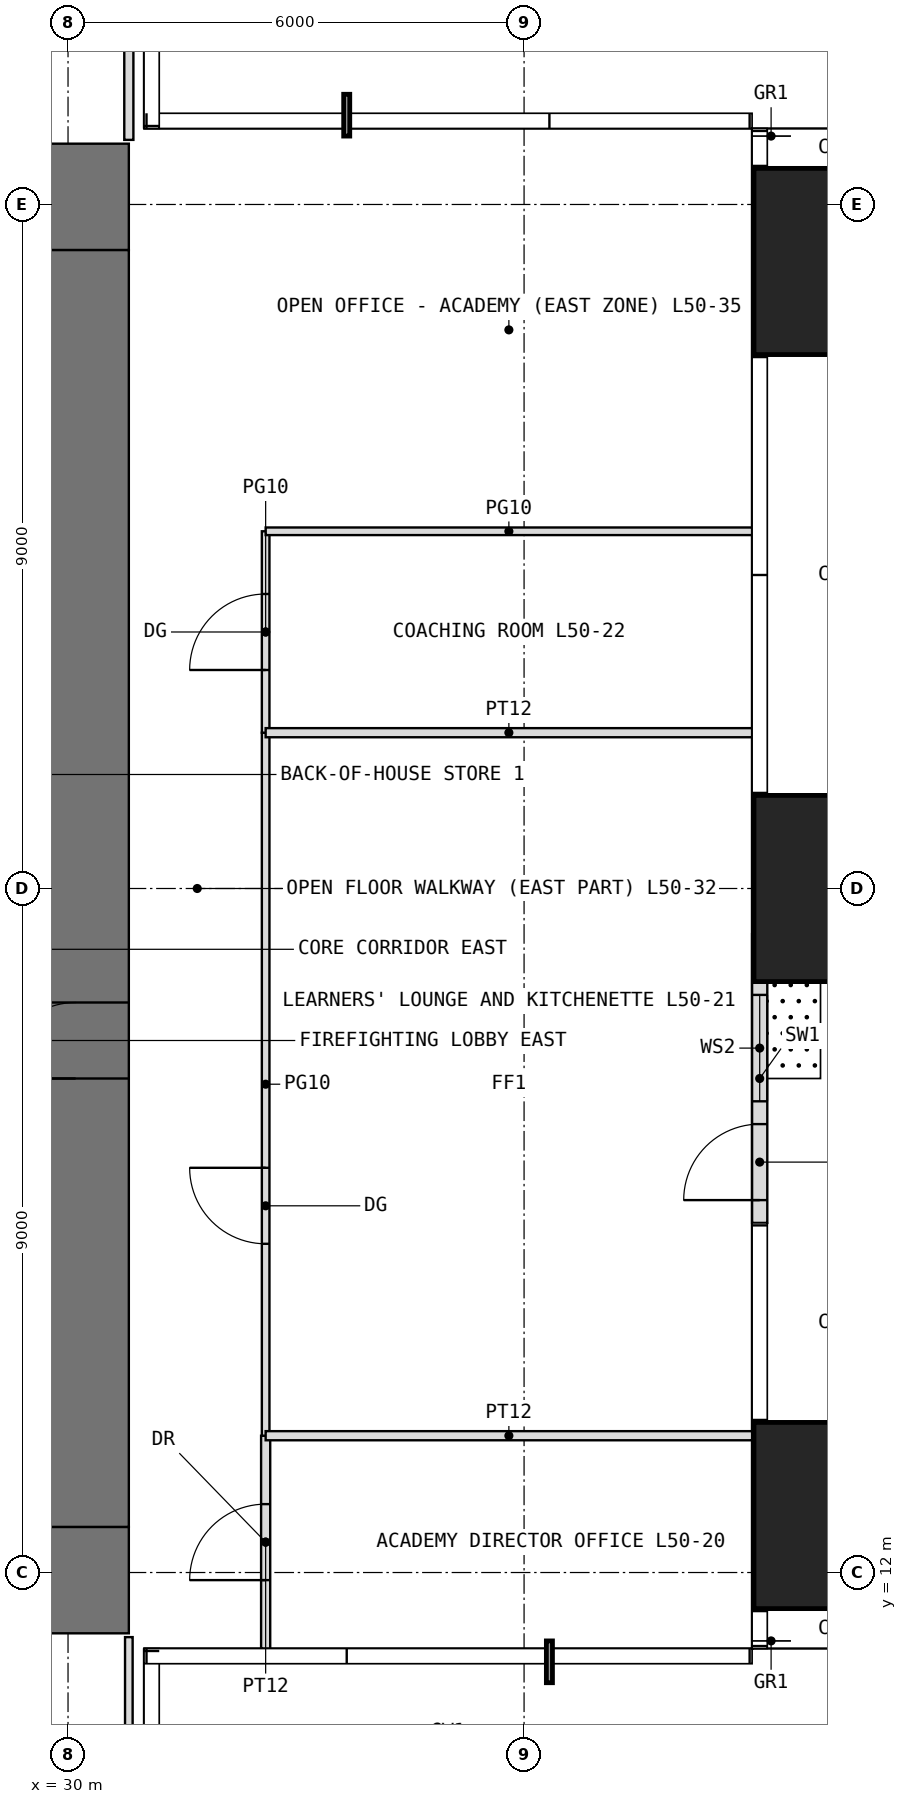
"""IFC4 building model, lengths in metres.
Left out: names, types, materials, properties, quantities, classifications, styles, units other than length and angle.
Written with IfcOpenShell. Run it as: python <this file> out.ifc"""

import sys

from ifc_helpers import new_model, si_unit, direction, frame, frame_2d, origin, origin_2d, place, context, subcontext, project, spatial, rectangle, extrude, element, fill, save


model = new_model("IFC4")
c1 = context("Model", 3, precision=1e-05, world=origin(), true_north=direction((0.0, 1.0)))
c2 = subcontext(c1, "Body", "Model", "MODEL_VIEW")
j1 = project(units=[si_unit("LENGTHUNIT", "METRE"), si_unit("PLANEANGLEUNIT", "RADIAN")], contexts=[c1])
p1 = place(None, origin())
s1 = spatial("IfcSite", under=j1, at=p1, CompositionType="ELEMENT")
p2 = place(p1, origin())
s2 = spatial("IfcBuilding", under=s1, at=p2, CompositionType="ELEMENT")
p3 = place(p2, frame((0.0, 0.0, 210.5)))
s3 = spatial("IfcBuildingStorey", under=s2, at=p3, CompositionType="ELEMENT", Elevation=210.5)
for number, where, z_axis, x_axis in (
    (1, (40.25, 12.75, 0.0), (0.0, 0.0, 1.0), (1.0, 0.0, 0.0)),
    (2, (40.25, 21.0, 0.0), (0.0, 0.0, 1.0), (1.0, 0.0, 0.0)),
    (3, (40.25, 29.25, 0.0), (0.0, 0.0, 1.0), (1.0, 0.0, 0.0)),
):
    element("IfcColumn", number, at=place(p3, frame(where, z_axis=z_axis, x_axis=x_axis)), inside=s3, PredefinedType="COLUMN", context=c2, shape_type="SweptSolid", body=[
        extrude(rectangle(XDim=2.45, YDim=2.45, at=origin_2d()), origin(), (0.0, 0.0, 1.0), 4.0),
    ])
p4 = place(p3, frame((39.1, 16.6, 0.0), z_axis=(0.0, 0.0, 1.0), x_axis=(0.0, 1.0, 0.0)))
e4 = element("IfcWall", 4, at=p4, inside=s3, PredefinedType="USERDEFINED", context=c2, shape_type="SweptSolid", body=[
    extrude(rectangle(XDim=3.8, YDim=0.2, at=frame_2d((1.9, 0.0))), origin(), (0.0, 0.0, 1.0), 3.75),
])
p5 = place(p4, frame((0.3, 0.0, 0.0)))
e5 = element("IfcOpeningElement", 5, at=p5, cuts=e4, PredefinedType="OPENING", context=c2, shape_type="SweptSolid", body=[
    extrude(rectangle(XDim=1.0, YDim=2.4, at=frame_2d((0.5, 1.2))), frame((0.0, 0.11, 0.0), z_axis=(0.0, -1.0, 0.0), x_axis=(1.0, 0.0, 0.0)), (0.0, 0.0, 1.0), 0.22),
])
p6 = place(p4, frame((1.6, 0.0, 0.3)))
e6 = element("IfcOpeningElement", 6, at=p6, cuts=e4, PredefinedType="OPENING", context=c2, shape_type="SweptSolid", body=[
    extrude(rectangle(XDim=1.4, YDim=2.7, at=frame_2d((0.7, 1.35))), frame((0.0, 0.11, 0.0), z_axis=(0.0, -1.0, 0.0), x_axis=(1.0, 0.0, 0.0)), (0.0, 0.0, 1.0), 0.22),
])
p7 = place(p3, frame((11.2, 11.9, -0.05), z_axis=(0.0, 0.0, 1.0), x_axis=(1.0, 0.0, 0.0)))
e7 = element("IfcWall", 7, at=p7, inside=s3, PredefinedType="SHEAR", context=c2, shape_type="SweptSolid", body=[
    extrude(rectangle(XDim=19.6, YDim=1.4, at=frame_2d((9.8, 0.0))), origin(), (0.0, 0.0, 1.0), 4.0),
])
p8 = place(p7, frame((8.8, 0.0, 0.05)))
e8 = element("IfcOpeningElement", 8, at=p8, cuts=e7, PredefinedType="OPENING", context=c2, shape_type="SweptSolid", body=[
    extrude(rectangle(XDim=2.0, YDim=2.2, at=frame_2d((1.0, 1.1))), frame((0.0, 0.71, 0.0), z_axis=(0.0, -1.0, 0.0), x_axis=(1.0, 0.0, 0.0)), (0.0, 0.0, 1.0), 1.42),
])
p9 = place(p3, frame((11.2, 30.1, -0.05), z_axis=(0.0, 0.0, 1.0), x_axis=(1.0, 0.0, 0.0)))
e9 = element("IfcWall", 9, at=p9, inside=s3, PredefinedType="SHEAR", context=c2, shape_type="SweptSolid", body=[
    extrude(rectangle(XDim=19.6, YDim=1.4, at=frame_2d((9.8, 0.0))), origin(), (0.0, 0.0, 1.0), 4.0),
])
p10 = place(p9, frame((8.8, 0.0, 0.05)))
e10 = element("IfcOpeningElement", 10, at=p10, cuts=e9, PredefinedType="OPENING", context=c2, shape_type="SweptSolid", body=[
    extrude(rectangle(XDim=2.0, YDim=2.2, at=frame_2d((1.0, 1.1))), frame((0.0, 0.71, 0.0), z_axis=(0.0, -1.0, 0.0), x_axis=(1.0, 0.0, 0.0)), (0.0, 0.0, 1.0), 1.42),
])
p11 = place(p3, frame((30.1, 12.6, -0.05), z_axis=(0.0, 0.0, 1.0), x_axis=(0.0, 1.0, 0.0)))
e11 = element("IfcWall", 11, at=p11, inside=s3, PredefinedType="SHEAR", context=c2, shape_type="SweptSolid", body=[
    extrude(rectangle(XDim=16.8, YDim=1.4, at=frame_2d((8.4, 0.0))), origin(), (0.0, 0.0, 1.0), 4.0),
])
p12 = place(p11, frame((5.9, 0.0, 0.05)))
e12 = element("IfcOpeningElement", 12, at=p12, cuts=e11, PredefinedType="OPENING", context=c2, shape_type="SweptSolid", body=[
    extrude(rectangle(XDim=1.0, YDim=2.2, at=frame_2d((0.5, 1.1))), frame((0.0, 0.71, 0.0), z_axis=(0.0, -1.0, 0.0), x_axis=(1.0, 0.0, 0.0)), (0.0, 0.0, 1.0), 1.42),
])
p13 = place(p3, frame((30.8, 5.6, 0.0), z_axis=(0.0, 0.0, 1.0), x_axis=(0.0, 1.0, 0.0)))
e13 = element("IfcWall", 13, at=p13, inside=s3, PredefinedType="PARTITIONING", context=c2, shape_type="SweptSolid", body=[
    extrude(rectangle(XDim=5.55, YDim=0.1, at=frame_2d((2.775, 0.0))), origin(), (0.0, 0.0, 1.0), 3.75),
])
p14 = place(p3, frame((30.8, 30.85, 0.0), z_axis=(0.0, 0.0, 1.0), x_axis=(0.0, 1.0, 0.0)))
e14 = element("IfcWall", 14, at=p14, inside=s3, PredefinedType="PARTITIONING", context=c2, shape_type="SweptSolid", body=[
    extrude(rectangle(XDim=4.45, YDim=0.12, at=frame_2d((2.225, 0.0))), origin(), (0.0, 0.0, 1.0), 3.75),
])
p15 = place(p3, frame((32.6, 11.0, 0.0), z_axis=(0.0, 0.0, 1.0), x_axis=(0.0, 1.0, 0.0)))
e15 = element("IfcWall", 15, at=p15, inside=s3, PredefinedType="PARTITIONING", context=c2, shape_type="SweptSolid", body=[
    extrude(rectangle(XDim=2.8, YDim=0.12, at=frame_2d((1.4, 0.0))), origin(), (0.0, 0.0, 1.0), 3.75),
])
p16 = place(p15, frame((0.9, 0.0, 0.0)))
e16 = element("IfcOpeningElement", 16, at=p16, cuts=e15, PredefinedType="OPENING", context=c2, shape_type="SweptSolid", body=[
    extrude(rectangle(XDim=1.0, YDim=2.2, at=frame_2d((0.5, 1.1))), frame((0.0, 0.07, 0.0), z_axis=(0.0, -1.0, 0.0), x_axis=(1.0, 0.0, 0.0)), (0.0, 0.0, 1.0), 0.14),
])
p17 = place(p3, frame((32.6, 13.8, 0.0), z_axis=(0.0, 0.0, 1.0), x_axis=(0.0, 1.0, 0.0)))
e17 = element("IfcWall", 17, at=p17, inside=s3, PredefinedType="PARTITIONING", context=c2, shape_type="SweptSolid", body=[
    extrude(rectangle(XDim=9.25, YDim=0.1, at=frame_2d((4.625, 0.0))), origin(), (0.0, 0.0, 1.0), 3.75),
])
p18 = place(p17, frame((2.525, 0.0, 0.0)))
e18 = element("IfcOpeningElement", 18, at=p18, cuts=e17, PredefinedType="OPENING", context=c2, shape_type="SweptSolid", body=[
    extrude(rectangle(XDim=1.0, YDim=2.4, at=frame_2d((0.5, 1.2))), frame((0.0, 0.06, 0.0), z_axis=(0.0, -1.0, 0.0), x_axis=(1.0, 0.0, 0.0)), (0.0, 0.0, 1.0), 0.12),
])
p19 = place(p3, frame((32.6, 13.8, 0.0), z_axis=(0.0, 0.0, 1.0), x_axis=(1.0, 0.0, 0.0)))
e19 = element("IfcWall", 19, at=p19, inside=s3, PredefinedType="PARTITIONING", context=c2, shape_type="SweptSolid", body=[
    extrude(rectangle(XDim=6.4, YDim=0.12, at=frame_2d((3.2, 0.0))), origin(), (0.0, 0.0, 1.0), 3.75),
])
p20 = place(p3, frame((32.6, 23.05, 0.0), z_axis=(0.0, 0.0, 1.0), x_axis=(0.0, 1.0, 0.0)))
e20 = element("IfcWall", 20, at=p20, inside=s3, PredefinedType="PARTITIONING", context=c2, shape_type="SweptSolid", body=[
    extrude(rectangle(XDim=2.65, YDim=0.1, at=frame_2d((1.325, 0.0))), origin(), (0.0, 0.0, 1.0), 3.75),
])
p21 = place(p20, frame((0.825, 0.0, 0.0)))
e21 = element("IfcOpeningElement", 21, at=p21, cuts=e20, PredefinedType="OPENING", context=c2, shape_type="SweptSolid", body=[
    extrude(rectangle(XDim=1.0, YDim=2.4, at=frame_2d((0.5, 1.2))), frame((0.0, 0.06, 0.0), z_axis=(0.0, -1.0, 0.0), x_axis=(1.0, 0.0, 0.0)), (0.0, 0.0, 1.0), 0.12),
])
p22 = place(p3, frame((32.6, 23.05, 0.0), z_axis=(0.0, 0.0, 1.0), x_axis=(1.0, 0.0, 0.0)))
e22 = element("IfcWall", 22, at=p22, inside=s3, PredefinedType="PARTITIONING", context=c2, shape_type="SweptSolid", body=[
    extrude(rectangle(XDim=6.4, YDim=0.12, at=frame_2d((3.2, 0.0))), origin(), (0.0, 0.0, 1.0), 3.75),
])
p23 = place(p3, frame((32.6, 25.7, 0.0), z_axis=(0.0, 0.0, 1.0), x_axis=(1.0, 0.0, 0.0)))
e23 = element("IfcWall", 23, at=p23, inside=s3, PredefinedType="PARTITIONING", context=c2, shape_type="SweptSolid", body=[
    extrude(rectangle(XDim=6.4, YDim=0.1, at=frame_2d((3.2, 0.0))), origin(), (0.0, 0.0, 1.0), 3.75),
])
p24 = place(p5, origin())
e24 = element("IfcDoor", 24, at=p24, inside=s3, OperationType="SINGLE_SWING_LEFT", PredefinedType="DOOR", context=c2, shape_type="SweptSolid", body=[
    extrude(rectangle(XDim=1.0, YDim=2.4, at=frame_2d((0.5, 1.2))), frame((0.0, 0.025, 0.0), z_axis=(0.0, -1.0, 0.0), x_axis=(1.0, 0.0, 0.0)), (0.0, 0.0, 1.0), 0.05),
])
fill(e5, e24)
p25 = place(p6, origin())
e25 = element("IfcWindow", 25, at=p25, inside=s3, PartitioningType="SINGLE_PANEL", PredefinedType="WINDOW", context=c2, shape_type="SweptSolid", body=[
    extrude(rectangle(XDim=1.4, YDim=2.7, at=frame_2d((0.7, 1.35))), frame((0.0, 0.03, 0.0), z_axis=(0.0, -1.0, 0.0), x_axis=(1.0, 0.0, 0.0)), (0.0, 0.0, 1.0), 0.06),
])
fill(e6, e25)
p26 = place(p12, origin())
e26 = element("IfcDoor", 26, at=p26, inside=s3, OperationType="SINGLE_SWING_LEFT", PredefinedType="DOOR", context=c2, shape_type="SweptSolid", body=[
    extrude(rectangle(XDim=1.0, YDim=2.2, at=frame_2d((0.5, 1.1))), frame((0.0, 0.025, 0.0), z_axis=(0.0, -1.0, 0.0), x_axis=(1.0, 0.0, 0.0)), (0.0, 0.0, 1.0), 0.05),
])
fill(e12, e26)
p27 = place(p16, origin())
e27 = element("IfcDoor", 27, at=p27, inside=s3, OperationType="SINGLE_SWING_LEFT", PredefinedType="DOOR", context=c2, shape_type="SweptSolid", body=[
    extrude(rectangle(XDim=1.0, YDim=2.2, at=frame_2d((0.5, 1.1))), frame((0.0, 0.025, 0.0), z_axis=(0.0, -1.0, 0.0), x_axis=(1.0, 0.0, 0.0)), (0.0, 0.0, 1.0), 0.05),
])
fill(e16, e27)
p28 = place(p18, origin())
e28 = element("IfcDoor", 28, at=p28, inside=s3, OperationType="SINGLE_SWING_RIGHT", PredefinedType="DOOR", context=c2, shape_type="SweptSolid", body=[
    extrude(rectangle(XDim=1.0, YDim=2.4, at=frame_2d((0.5, 1.2))), frame((0.0, 0.025, 0.0), z_axis=(0.0, -1.0, 0.0), x_axis=(1.0, 0.0, 0.0)), (0.0, 0.0, 1.0), 0.05),
])
fill(e18, e28)
p29 = place(p21, origin())
e29 = element("IfcDoor", 29, at=p29, inside=s3, OperationType="SINGLE_SWING_LEFT", PredefinedType="DOOR", context=c2, shape_type="SweptSolid", body=[
    extrude(rectangle(XDim=1.0, YDim=2.4, at=frame_2d((0.5, 1.2))), frame((0.0, 0.025, 0.0), z_axis=(0.0, -1.0, 0.0), x_axis=(1.0, 0.0, 0.0)), (0.0, 0.0, 1.0), 0.05),
])
fill(e21, e29)
save(model, sys.argv[1])
